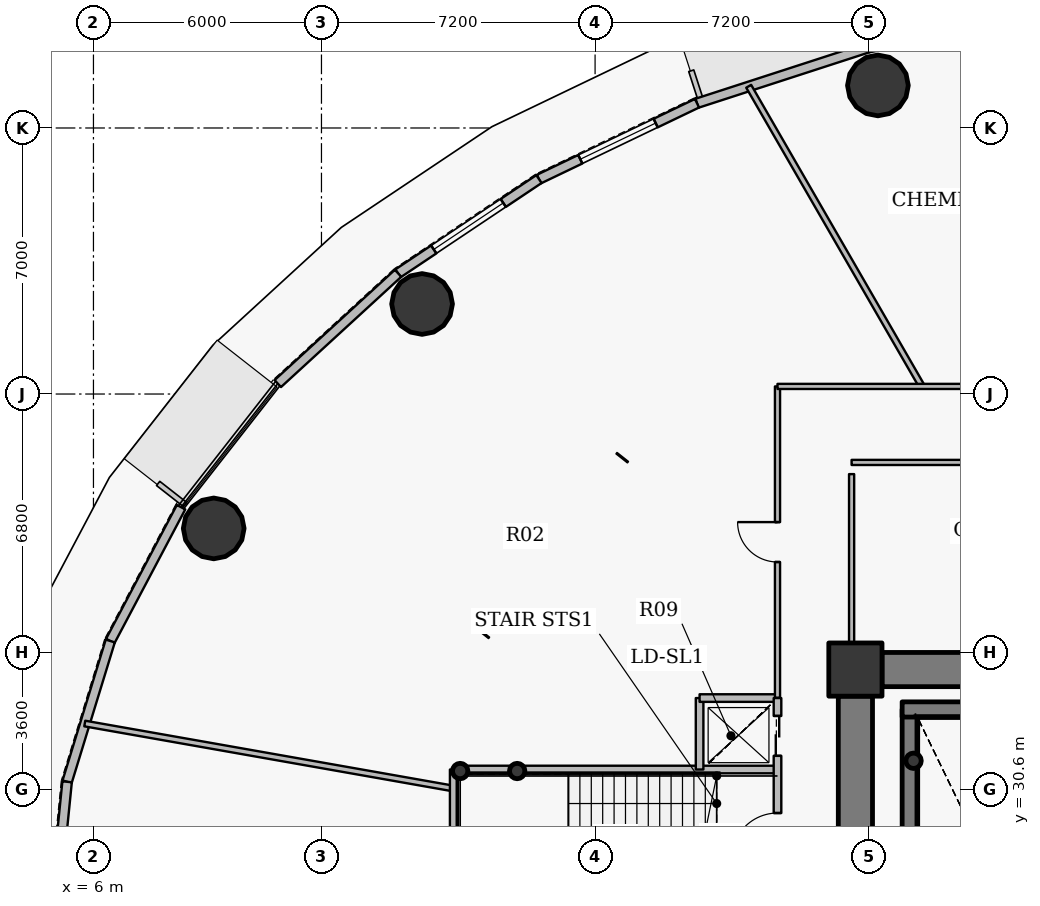
"""IFC4 building model, lengths in metres.
Left out: names, types, materials, properties, quantities, classifications, styles, units other than length and angle.
Written with IfcOpenShell. Run it as: python <this file> out.ifc"""

import sys

from ifc_helpers import new_model, si_unit, direction, frame, frame_2d, origin, origin_2d, place, context, subcontext, project, spatial, rectangle, hollow_circle, extrude, source, transform, mapped, element, fill, save


model = new_model("IFC4")
c1 = context("Model", 3, precision=1e-05, world=origin(), true_north=direction((0.0, 1.0)))
c2 = subcontext(c1, "Body", "Model", "MODEL_VIEW")
j1 = project(units=[si_unit("LENGTHUNIT", "METRE"), si_unit("PLANEANGLEUNIT", "RADIAN")], contexts=[c1])
p1 = place(None, origin())
s1 = spatial("IfcSite", under=j1, at=p1, CompositionType="ELEMENT")
p2 = place(p1, origin())
s2 = spatial("IfcBuilding", under=s1, at=p2, CompositionType="ELEMENT")
p3 = place(p2, frame((0.0, 0.0, 32.4)))
s3 = spatial("IfcBuildingStorey", under=s2, at=p3, CompositionType="ELEMENT", Elevation=32.4)
p4 = place(p3, frame((26.05, 33.75, 0.0), z_axis=(0.0, 0.0, 1.0), x_axis=(1.0, 0.0, 0.0)))
e1 = element("IfcColumn", 1, at=p4, inside=s3, PredefinedType="COLUMN", context=c2, shape_type="SweptSolid", body=[
    extrude(rectangle(XDim=1.4, YDim=1.4, at=origin_2d()), origin(), (0.0, 0.0, 1.0), 4.2),
])
p5 = place(p3, frame((27.48, 24.1, 0.0), z_axis=(0.0, 0.0, 1.0), x_axis=(0.0, 1.0, 0.0)))
e2 = element("IfcWall", 2, at=p5, inside=s3, PredefinedType="SHEAR", context=c2, shape_type="SweptSolid", body=[
    extrude(rectangle(XDim=8.6, YDim=0.4, at=frame_2d((4.3, 0.0))), origin(), (0.0, 0.0, 1.0), 4.2),
])
p6 = place(p3, frame((27.28, 32.7, 0.0), z_axis=(0.0, 0.0, 1.0), x_axis=(1.0, 0.0, 0.0)))
e3 = element("IfcWall", 3, at=p6, inside=s3, PredefinedType="SHEAR", context=c2, shape_type="SweptSolid", body=[
    extrude(rectangle(XDim=4.1, YDim=0.4, at=frame_2d((2.05, 0.0))), origin(), (0.0, 0.0, 1.0), 4.2),
])
for number, where, z_axis, x_axis in (
    (4, (27.58, 31.35, 0.0), (0.0, 0.0, 1.0), (1.0, 0.0, 0.0)),
    (5, (15.65, 31.08, 0.0), (0.0, 0.0, 1.0), (1.0, 0.0, 0.0)),
    (6, (17.15, 31.08, 0.0), (0.0, 0.0, 1.0), (1.0, 0.0, 0.0)),
):
    element("IfcColumn", number, at=place(p3, frame(where, z_axis=z_axis, x_axis=x_axis)), inside=s3, PredefinedType="COLUMN", context=c2, shape_type="SweptSolid", body=[
        extrude(hollow_circle(Radius=0.203, WallThickness=0.016, at=origin_2d()), origin(), (0.0, 0.0, 1.0), 4.2),
    ])
p7 = place(p3, frame((26.75, 33.75, 0.0), z_axis=(0.0, 0.0, 1.0), x_axis=(1.0, 0.0, 0.0)))
e7 = element("IfcWall", 7, at=p7, inside=s3, PredefinedType="SHEAR", context=c2, shape_type="SweptSolid", body=[
    extrude(rectangle(XDim=18.5, YDim=0.9, at=frame_2d((9.25, 0.0))), origin(), (0.0, 0.0, 1.0), 3.4),
])
p8 = place(p3, frame((26.05, 20.95, 0.0), z_axis=(0.0, 0.0, 1.0), x_axis=(0.0, 1.0, 0.0)))
e8 = element("IfcWall", 8, at=p8, inside=s3, PredefinedType="SHEAR", context=c2, shape_type="SweptSolid", body=[
    extrude(rectangle(XDim=12.1, YDim=0.9, at=frame_2d((6.05, 0.0))), origin(), (0.0, 0.0, 1.0), 3.4),
])
p9 = place(p8, frame((5.64, 0.0, 0.0)))
e9 = element("IfcOpeningElement", 9, at=p9, cuts=e8, PredefinedType="OPENING", context=c2, shape_type="SweptSolid", body=[
    extrude(rectangle(XDim=0.82, YDim=2.1, at=origin_2d()), frame((0.41, 0.46, 1.05), z_axis=(0.0, -1.0, 0.0), x_axis=(1.0, 0.0, 0.0)), (0.0, 0.0, 1.0), 0.92),
])
for number, where, z_axis, x_axis in (
    (10, (26.642, 49.12, -0.25), (0.0, 0.0, 1.0), (1.0, 0.0, 0.0)),
    (11, (14.647, 43.369, -0.25), (0.0, 0.0, 1.0), (1.0, 0.0, 0.0)),
    (12, (9.165, 37.464, -0.25), (0.0, 0.0, 1.0), (1.0, 0.0, 0.0)),
):
    element("IfcColumn", number, at=place(p3, frame(where, z_axis=z_axis, x_axis=x_axis)), inside=s3, PredefinedType="COLUMN", context=c2, shape_type="SweptSolid", body=[
        extrude(hollow_circle(Radius=0.8, WallThickness=0.045, at=origin_2d()), origin(), (0.0, 0.0, 1.0), 4.45),
    ])
p10 = place(p3, frame((21.882, 48.651, 0.0), z_axis=(0.0, 0.0, 1.0), x_axis=(0.951207699013, 0.308551313946, 0.0)))
e13 = element("IfcWall", 13, at=p10, inside=s3, PredefinedType="SOLIDWALL", context=c2, shape_type="SweptSolid", body=[
    extrude(rectangle(XDim=4.739, YDim=0.25, at=frame_2d((2.369, 0.0))), origin(), (0.0, 0.0, 1.0), 3.95),
])
p11 = place(p3, frame((17.723, 46.656, 0.0), z_axis=(0.0, 0.0, 1.0), x_axis=(0.901601503137, 0.432567601123, 0.0)))
e14 = element("IfcWall", 14, at=p11, inside=s3, PredefinedType="SOLIDWALL", context=c2, shape_type="SweptSolid", body=[
    extrude(rectangle(XDim=4.613, YDim=0.25, at=frame_2d((2.306, 0.0))), origin(), (0.0, 0.0, 1.0), 3.95),
])
p12 = place(p11, frame((1.207, 0.0, 0.9)))
e15 = element("IfcOpeningElement", 15, at=p12, cuts=e14, PredefinedType="OPENING", context=c2, shape_type="SweptSolid", body=[
    extrude(rectangle(XDim=2.2, YDim=2.0, at=origin_2d()), frame((1.1, 0.135, 1.0), z_axis=(0.0, -1.0, 0.0), x_axis=(1.0, 0.0, 0.0)), (0.0, 0.0, 1.0), 0.27),
])
p13 = place(p3, frame((14.015, 44.176, 0.0), z_axis=(0.0, 0.0, 1.0), x_axis=(0.831240982525, 0.555912249343, 0.0)))
e16 = element("IfcWall", 16, at=p13, inside=s3, PredefinedType="SOLIDWALL", context=c2, shape_type="SweptSolid", body=[
    extrude(rectangle(XDim=4.46, YDim=0.25, at=frame_2d((2.23, 0.0))), origin(), (0.0, 0.0, 1.0), 3.95),
])
p14 = place(p13, frame((1.13, 0.0, 0.9)))
e17 = element("IfcOpeningElement", 17, at=p14, cuts=e16, PredefinedType="OPENING", context=c2, shape_type="SweptSolid", body=[
    extrude(rectangle(XDim=2.2, YDim=2.0, at=origin_2d()), frame((1.1, 0.135, 1.0), z_axis=(0.0, -1.0, 0.0), x_axis=(1.0, 0.0, 0.0)), (0.0, 0.0, 1.0), 0.27),
])
p15 = place(p3, frame((10.85, 41.275, 0.0), z_axis=(0.0, 0.0, 1.0), x_axis=(0.737116376281, 0.67576582321, 0.0)))
e18 = element("IfcWall", 18, at=p15, inside=s3, PredefinedType="SOLIDWALL", context=c2, shape_type="SweptSolid", body=[
    extrude(rectangle(XDim=4.294, YDim=0.25, at=frame_2d((2.147, 0.0))), origin(), (0.0, 0.0, 1.0), 3.95),
])
p16 = place(p3, frame((6.442, 34.501, 0.0), z_axis=(0.0, 0.0, 1.0), x_axis=(0.467662443071, 0.883907144072, 0.0)))
e19 = element("IfcWall", 19, at=p16, inside=s3, PredefinedType="SOLIDWALL", context=c2, shape_type="SweptSolid", body=[
    extrude(rectangle(XDim=3.984, YDim=0.25, at=frame_2d((1.992, 0.0))), origin(), (0.0, 0.0, 1.0), 3.95),
])
p17 = place(p3, frame((5.307, 30.797, 0.0), z_axis=(0.0, 0.0, 1.0), x_axis=(0.293111631758, 0.956078224482, 0.0)))
e20 = element("IfcWall", 20, at=p17, inside=s3, PredefinedType="SOLIDWALL", context=c2, shape_type="SweptSolid", body=[
    extrude(rectangle(XDim=3.875, YDim=0.25, at=frame_2d((1.938, 0.0))), origin(), (0.0, 0.0, 1.0), 3.95),
])
p18 = place(p3, frame((4.925, 27.0, 0.0), z_axis=(0.0, 0.0, 1.0), x_axis=(0.099997795174, 0.994987658698, 0.0)))
e21 = element("IfcWall", 21, at=p18, inside=s3, PredefinedType="SOLIDWALL", context=c2, shape_type="SweptSolid", body=[
    extrude(rectangle(XDim=3.816, YDim=0.25, at=frame_2d((1.908, 0.0))), origin(), (0.0, 0.0, 1.0), 3.95),
])
p19 = place(p3, frame((5.771, 32.33, 0.0), z_axis=(0.0, 0.0, 1.0), x_axis=(0.984806985247, -0.173652531825, 0.0)))
e22 = element("IfcWall", 22, at=p19, inside=s3, PredefinedType="PARTITIONING", context=c2, shape_type="SweptSolid", body=[
    extrude(rectangle(XDim=9.858, YDim=0.15, at=frame_2d((4.929, 0.0))), origin(), (0.0, 0.0, 1.0), 3.335),
])
p20 = place(p3, frame((15.48, 27.58, 0.0), z_axis=(0.0, 0.0, 1.0), x_axis=(0.0, 1.0, 0.0)))
e23 = element("IfcWall", 23, at=p20, inside=s3, PredefinedType="PARTITIONING", context=c2, shape_type="SweptSolid", body=[
    extrude(rectangle(XDim=3.54, YDim=0.2, at=frame_2d((1.77, 0.0))), origin(), (0.0, 0.0, 1.0), 3.95),
])
p21 = place(p3, frame((15.48, 31.12, 0.0), z_axis=(0.0, 0.0, 1.0), x_axis=(1.0, 0.0, 0.0)))
e24 = element("IfcWall", 24, at=p21, inside=s3, PredefinedType="PARTITIONING", context=c2, shape_type="SweptSolid", body=[
    extrude(rectangle(XDim=8.52, YDim=0.2, at=frame_2d((4.26, 0.0))), origin(), (0.0, 0.0, 1.0), 3.95),
])
p22 = place(p3, frame((21.95, 31.12, 0.0), z_axis=(0.0, 0.0, 1.0), x_axis=(0.0, 1.0, 0.0)))
e25 = element("IfcWall", 25, at=p22, inside=s3, PredefinedType="PARTITIONING", context=c2, shape_type="SweptSolid", body=[
    extrude(rectangle(XDim=1.88, YDim=0.2, at=frame_2d((0.94, 0.0))), origin(), (0.0, 0.0, 1.0), 3.285),
])
p23 = place(p3, frame((21.95, 33.0, 0.0), z_axis=(0.0, 0.0, 1.0), x_axis=(1.0, 0.0, 0.0)))
e26 = element("IfcWall", 26, at=p23, inside=s3, PredefinedType="PARTITIONING", context=c2, shape_type="SweptSolid", body=[
    extrude(rectangle(XDim=2.05, YDim=0.2, at=frame_2d((1.025, 0.0))), origin(), (0.0, 0.0, 1.0), 3.95),
])
p24 = place(p3, frame((23.242, 49.098, 0.0), z_axis=(0.0, 0.0, 1.0), x_axis=(0.499985867395, -0.866033563094, 0.0)))
e27 = element("IfcWall", 27, at=p24, inside=s3, PredefinedType="PARTITIONING", context=c2, shape_type="SweptSolid", body=[
    extrude(rectangle(XDim=9.119, YDim=0.15, at=frame_2d((4.56, 0.0))), origin(), (0.0, 0.0, 1.0), 3.335),
])
p25 = place(p3, frame((24.0, 27.59, 0.0), z_axis=(0.0, 0.0, 1.0), x_axis=(0.0, 1.0, 0.0)))
e28 = element("IfcWall", 28, at=p25, inside=s3, PredefinedType="PARTITIONING", context=c2, shape_type="SweptSolid", body=[
    extrude(rectangle(XDim=5.41, YDim=0.2, at=frame_2d((2.705, 0.0))), origin(), (0.0, 0.0, 1.0), 3.285),
])
p26 = place(p25, frame((1.185, 0.0, 0.0)))
e29 = element("IfcOpeningElement", 29, at=p26, cuts=e28, PredefinedType="OPENING", context=c2, shape_type="SweptSolid", body=[
    extrude(rectangle(XDim=1.2, YDim=2.15, at=origin_2d()), frame((0.6, 0.11, 1.075), z_axis=(0.0, -1.0, 0.0), x_axis=(1.0, 0.0, 0.0)), (0.0, 0.0, 1.0), 0.22),
])
p27 = place(p25, frame((3.89, 0.0, 0.0)))
e30 = element("IfcOpeningElement", 30, at=p27, cuts=e28, PredefinedType="OPENING", context=c2, shape_type="SweptSolid", body=[
    extrude(rectangle(XDim=1.05, YDim=2.15, at=origin_2d()), frame((0.525, 0.11, 1.075), z_axis=(0.0, -1.0, 0.0), x_axis=(1.0, 0.0, 0.0)), (0.0, 0.0, 1.0), 0.22),
])
p28 = place(p3, frame((24.0, 33.01, 0.0), z_axis=(0.0, 0.0, 1.0), x_axis=(0.0, 1.0, 0.0)))
e31 = element("IfcWall", 31, at=p28, inside=s3, PredefinedType="PARTITIONING", context=c2, shape_type="SweptSolid", body=[
    extrude(rectangle(XDim=8.19, YDim=0.135, at=frame_2d((4.095, 0.0))), origin(), (0.0, 0.0, 1.0), 3.285),
])
p29 = place(p28, frame((3.57, 0.0, 0.0)))
e32 = element("IfcOpeningElement", 32, at=p29, cuts=e31, PredefinedType="OPENING", context=c2, shape_type="SweptSolid", body=[
    extrude(rectangle(XDim=1.05, YDim=2.15, at=origin_2d()), frame((0.525, 0.078, 1.075), z_axis=(0.0, -1.0, 0.0), x_axis=(1.0, 0.0, 0.0)), (0.0, 0.0, 1.0), 0.155),
])
p30 = place(p3, frame((24.0, 41.2, 0.0), z_axis=(0.0, 0.0, 1.0), x_axis=(1.0, 0.0, 0.0)))
e33 = element("IfcWall", 33, at=p30, inside=s3, PredefinedType="PARTITIONING", context=c2, shape_type="SweptSolid", body=[
    extrude(rectangle(XDim=24.0, YDim=0.135, at=frame_2d((12.0, 0.0))), origin(), (0.0, 0.0, 1.0), 3.285),
])
p31 = place(p30, frame((9.96, 0.0, 0.0)))
e34 = element("IfcOpeningElement", 34, at=p31, cuts=e33, PredefinedType="OPENING", context=c2, shape_type="SweptSolid", body=[
    extrude(rectangle(XDim=1.05, YDim=2.15, at=origin_2d()), frame((0.525, 0.078, 1.075), z_axis=(0.0, -1.0, 0.0), x_axis=(1.0, 0.0, 0.0)), (0.0, 0.0, 1.0), 0.155),
])
p32 = place(p3, frame((38.893, 39.2, 0.0), z_axis=(0.0, 0.0, 1.0), x_axis=(-1.0, 0.0, 0.0)))
e35 = element("IfcWall", 35, at=p32, inside=s3, PredefinedType="PARTITIONING", context=c2, shape_type="SweptSolid", body=[
    extrude(rectangle(XDim=12.943, YDim=0.135, at=frame_2d((6.471, 0.0))), origin(), (0.0, 0.0, 1.0), 3.285),
])
p33 = place(p3, frame((25.95, 38.893, 0.0), z_axis=(0.0, 0.0, 1.0), x_axis=(0.0, -1.0, 0.0)))
e36 = element("IfcWall", 36, at=p33, inside=s3, PredefinedType="PARTITIONING", context=c2, shape_type="SweptSolid", body=[
    extrude(rectangle(XDim=4.693, YDim=0.135, at=frame_2d((2.346, 0.0))), origin(), (0.0, 0.0, 1.0), 3.285),
])
p34 = place(p3, frame((25.6, 34.2, 0.0), z_axis=(0.0, 0.0, 1.0), x_axis=(0.0, -1.0, 0.0)))
e37 = element("IfcWall", 37, at=p34, inside=s3, PredefinedType="PARTITIONING", context=c2, shape_type="SweptSolid", body=[
    extrude(rectangle(XDim=1.14, YDim=0.135, at=frame_2d((0.57, 0.0))), origin(), (0.0, 0.0, 1.0), 3.95),
])
m1 = source(origin(), c2, "Body", "SweptSolid", [
    extrude(rectangle(XDim=2.2, YDim=2.0, at=origin_2d()), frame((1.1, 0.03, 1.0), z_axis=(0.0, -1.0, 0.0), x_axis=(1.0, 0.0, 0.0)), (0.0, 0.0, 1.0), 0.06),
])
p35 = place(p12, origin())
e38 = element("IfcWindow", 38, at=p35, inside=s3, PartitioningType="TRIPLE_PANEL_VERTICAL", PredefinedType="WINDOW", context=c2, shape_type="MappedRepresentation", body=[
    mapped(m1, transform((0.0, 0.0, 0.0), x_axis=(1.0, 0.0, 0.0), y_axis=(0.0, 1.0, 0.0), z_axis=(0.0, 0.0, 1.0), scale=1.0)),
])
fill(e15, e38)
p36 = place(p14, origin())
e39 = element("IfcWindow", 39, at=p36, inside=s3, PartitioningType="TRIPLE_PANEL_VERTICAL", PredefinedType="WINDOW", context=c2, shape_type="MappedRepresentation", body=[
    mapped(m1, transform((0.0, 0.0, 0.0), x_axis=(1.0, 0.0, 0.0), y_axis=(0.0, 1.0, 0.0), z_axis=(0.0, 0.0, 1.0), scale=1.0)),
])
fill(e17, e39)
m2 = source(origin(), c2, "Body", "SweptSolid", [
    extrude(rectangle(XDim=1.2, YDim=2.15, at=origin_2d()), frame((0.6, 0.025, 1.075), z_axis=(0.0, -1.0, 0.0), x_axis=(1.0, 0.0, 0.0)), (0.0, 0.0, 1.0), 0.05),
])
p37 = place(p26, origin())
e40 = element("IfcDoor", 40, at=p37, inside=s3, OperationType="SINGLE_SWING_LEFT", PredefinedType="DOOR", context=c2, shape_type="MappedRepresentation", body=[
    mapped(m2, transform((0.0, 0.0, 0.0), x_axis=(1.0, 0.0, 0.0), y_axis=(0.0, 1.0, 0.0), z_axis=(0.0, 0.0, 1.0), scale=1.0)),
])
fill(e29, e40)
m3 = source(origin(), c2, "Body", "SweptSolid", [
    extrude(rectangle(XDim=1.05, YDim=2.15, at=origin_2d()), frame((0.525, 0.025, 1.075), z_axis=(0.0, -1.0, 0.0), x_axis=(1.0, 0.0, 0.0)), (0.0, 0.0, 1.0), 0.05),
])
p38 = place(p27, origin())
e41 = element("IfcDoor", 41, at=p38, inside=s3, OperationType="DOUBLE_DOOR_SLIDING", PredefinedType="USERDEFINED", context=c2, shape_type="MappedRepresentation", body=[
    mapped(m3, transform((0.0, 0.0, 0.0), x_axis=(1.0, 0.0, 0.0), y_axis=(0.0, 1.0, 0.0), z_axis=(0.0, 0.0, 1.0), scale=1.0)),
])
fill(e30, e41)
m4 = source(origin(), c2, "Body", "SweptSolid", [
    extrude(rectangle(XDim=1.05, YDim=2.15, at=origin_2d()), frame((0.525, 0.025, 1.075), z_axis=(0.0, -1.0, 0.0), x_axis=(1.0, 0.0, 0.0)), (0.0, 0.0, 1.0), 0.05),
])
p39 = place(p29, origin())
e42 = element("IfcDoor", 42, at=p39, inside=s3, OperationType="SINGLE_SWING_RIGHT", PredefinedType="DOOR", context=c2, shape_type="MappedRepresentation", body=[
    mapped(m4, transform((0.0, 0.0, 0.0), x_axis=(1.0, 0.0, 0.0), y_axis=(0.0, 1.0, 0.0), z_axis=(0.0, 0.0, 1.0), scale=1.0)),
])
fill(e32, e42)
save(model, sys.argv[1])
